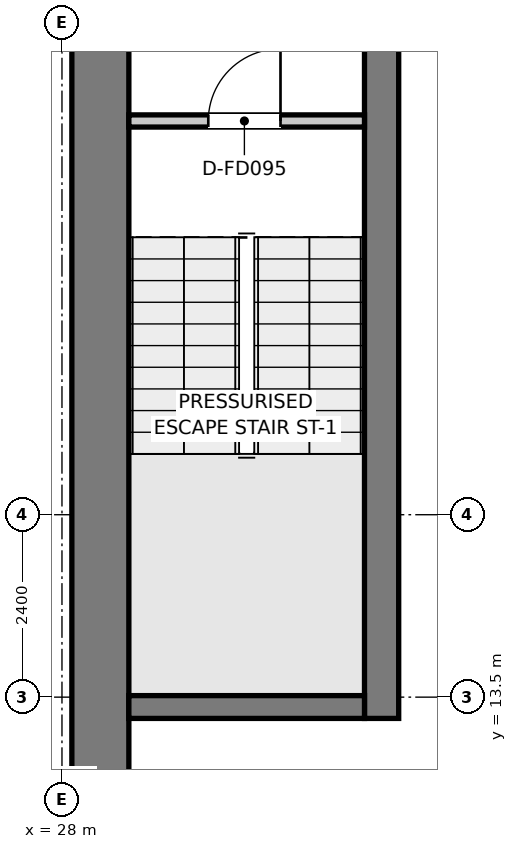
"""IFC4 building model, lengths in metres.
Left out: names, types, materials, properties, quantities, classifications, styles, units other than length and angle.
Written with IfcOpenShell. Run it as: python <this file> out.ifc"""

import sys

from ifc_helpers import new_model, si_unit, direction, frame, frame_2d, origin, place, context, subcontext, project, spatial, rectangle, extrude, element, fill, save


model = new_model("IFC4")
c1 = context("Model", 3, precision=1e-05, world=origin(), true_north=direction((0.0, 1.0)))
c2 = subcontext(c1, "Body", "Model", "MODEL_VIEW")
j1 = project(units=[si_unit("LENGTHUNIT", "METRE"), si_unit("PLANEANGLEUNIT", "RADIAN")], contexts=[c1])
p1 = place(None, origin())
s1 = spatial("IfcSite", under=j1, at=p1, CompositionType="ELEMENT")
p2 = place(p1, origin())
s2 = spatial("IfcBuilding", under=s1, at=p2, CompositionType="ELEMENT")
p3 = place(p2, frame((0.0, 0.0, 367.05)))
s3 = spatial("IfcBuildingStorey", under=s2, at=p3, CompositionType="ELEMENT", Elevation=367.05)
p4 = place(p3, frame((28.505, 11.25, 0.0), z_axis=(0.0, 0.0, 1.0), x_axis=(0.0, 1.0, 0.0)))
e1 = element("IfcWall", 1, at=p4, inside=s3, PredefinedType="SHEAR", context=c2, shape_type="SweptSolid", body=[
    extrude(rectangle(XDim=14.8, YDim=0.75, at=frame_2d((7.4, 0.0))), origin(), (0.0, 0.0, 1.0), 3.8),
])
p5 = place(p3, frame((32.205, 13.22, 0.0), z_axis=(0.0, 0.0, 1.0), x_axis=(0.0, 1.0, 0.0)))
e2 = element("IfcWall", 2, at=p5, inside=s3, PredefinedType="SHEAR", context=c2, shape_type="SweptSolid", body=[
    extrude(rectangle(XDim=12.83, YDim=0.45, at=frame_2d((6.415, 0.0))), origin(), (0.0, 0.0, 1.0), 3.8),
])
p6 = place(p5, frame((10.58, 0.0, 0.0)))
e3 = element("IfcOpeningElement", 3, at=p6, cuts=e2, PredefinedType="OPENING", context=c2, shape_type="SweptSolid", body=[
    extrude(rectangle(XDim=1.1, YDim=2.15, at=frame_2d((0.55, 1.075))), frame((0.0, 0.235, 0.0), z_axis=(0.0, -1.0, 0.0), x_axis=(1.0, 0.0, 0.0)), (0.0, 0.0, 1.0), 0.47),
])
p7 = place(p3, frame((28.88, 13.37, 0.0), z_axis=(0.0, 0.0, 1.0), x_axis=(1.0, 0.0, 0.0)))
e4 = element("IfcWall", 4, at=p7, inside=s3, PredefinedType="SHEAR", context=c2, shape_type="SweptSolid", body=[
    extrude(rectangle(XDim=3.1, YDim=0.3, at=frame_2d((1.55, 0.0))), origin(), (0.0, 0.0, 1.0), 3.8),
])
p8 = place(p3, frame((28.88, 21.08, 0.0), z_axis=(0.0, 0.0, 1.0), x_axis=(1.0, 0.0, 0.0)))
e5 = element("IfcWall", 5, at=p8, inside=s3, PredefinedType="PARTITIONING", context=c2, shape_type="SweptSolid", body=[
    extrude(rectangle(XDim=3.1, YDim=0.16, at=frame_2d((1.55, 0.0))), origin(), (0.0, 0.0, 1.0), 3.5),
])
p9 = place(p8, frame((1.045, 0.0, 0.0)))
e6 = element("IfcOpeningElement", 6, at=p9, cuts=e5, PredefinedType="OPENING", context=c2, shape_type="SweptSolid", body=[
    extrude(rectangle(XDim=0.95, YDim=2.1, at=frame_2d((0.475, 1.05))), frame((0.0, 0.09, 0.0), z_axis=(0.0, -1.0, 0.0), x_axis=(1.0, 0.0, 0.0)), (0.0, 0.0, 1.0), 0.18),
])
p10 = place(p9, origin())
e7 = element("IfcDoor", 7, at=p10, inside=s3, OperationType="SINGLE_SWING_RIGHT", PredefinedType="DOOR", context=c2, shape_type="SweptSolid", body=[
    extrude(rectangle(XDim=0.95, YDim=2.1, at=frame_2d((0.475, 1.05))), frame((0.0, 0.025, 0.0), z_axis=(0.0, -1.0, 0.0), x_axis=(1.0, 0.0, 0.0)), (0.0, 0.0, 1.0), 0.05),
])
fill(e6, e7)
save(model, sys.argv[1])
